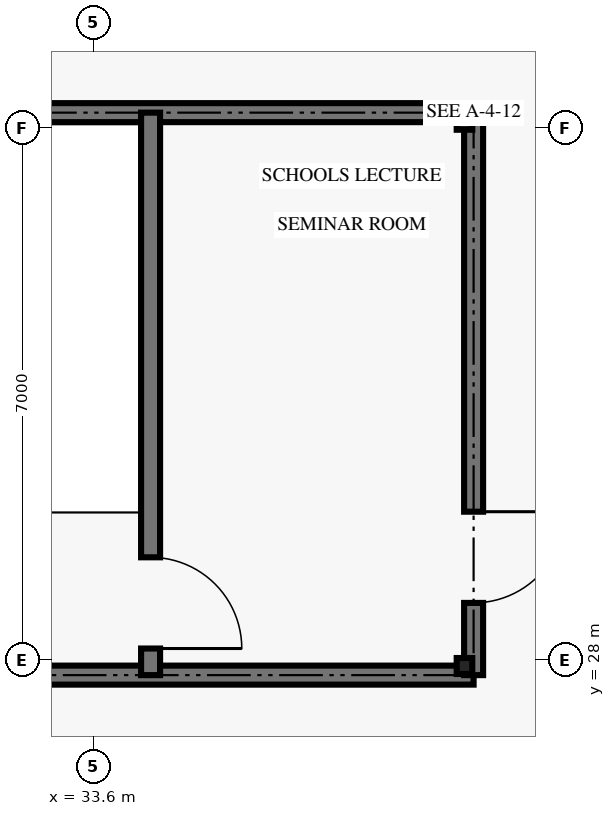
"""IFC4 building model, lengths in metres.
Left out: names, types, materials, properties, quantities, classifications, styles, units other than length and angle.
Written with IfcOpenShell. Run it as: python <this file> out.ifc"""

import sys

from ifc_helpers import new_model, si_unit, direction, frame, frame_2d, origin, origin_2d, place, context, subcontext, project, spatial, rectangle, i_section, extrude, element, fill, save


model = new_model("IFC4")
c1 = context("Model", 3, precision=1e-05, world=origin(), true_north=direction((0.0, 1.0)))
c2 = subcontext(c1, "Body", "Model", "MODEL_VIEW")
j1 = project(units=[si_unit("LENGTHUNIT", "METRE"), si_unit("PLANEANGLEUNIT", "RADIAN")], contexts=[c1])
p1 = place(None, origin())
s1 = spatial("IfcSite", under=j1, at=p1, CompositionType="ELEMENT")
p2 = place(p1, origin())
s2 = spatial("IfcBuilding", under=s1, at=p2, CompositionType="ELEMENT")
p3 = place(p2, frame((0.0, 0.0, 5.4)))
s3 = spatial("IfcBuildingStorey", under=s2, at=p3, CompositionType="ELEMENT", Elevation=5.4)
for number, where, z_axis, x_axis in (
    (1, (38.48, 27.92, 0.0), (0.0, 0.0, 1.0), (1.0, 0.0, 0.0)),
    (2, (38.48, 35.08, 0.0), (0.0, 0.0, 1.0), (1.0, 0.0, 0.0)),
):
    element("IfcColumn", number, at=place(p3, frame(where, z_axis=z_axis, x_axis=x_axis)), inside=s3, PredefinedType="COLUMN", context=c2, shape_type="SweptSolid", body=[
        extrude(i_section(OverallWidth=0.205, OverallDepth=0.21, WebThickness=0.009, FlangeThickness=0.014, FilletRadius=0.01, at=origin_2d()), origin(), (0.0, 0.0, 1.0), 4.8),
    ])
for number, where, z_axis, x_axis in (
    (3, (29.4, 35.2, 0.0), (0.0, 0.0, 1.0), (1.0, 0.0, 0.0)),
    (4, (38.6, 27.8, 0.0), (0.0, 0.0, 1.0), (-1.0, 0.0, 0.0)),
):
    element("IfcWall", number, at=place(p3, frame(where, z_axis=z_axis, x_axis=x_axis)), inside=s3, PredefinedType="SHEAR", context=c2, shape_type="SweptSolid", body=[
        extrude(rectangle(XDim=9.2, YDim=0.25, at=frame_2d((4.6, 0.0))), origin(), (0.0, 0.0, 1.0), 4.56),
    ])
p4 = place(p3, frame((38.6, 35.2, 0.0), z_axis=(0.0, 0.0, 1.0), x_axis=(0.0, -1.0, 0.0)))
e5 = element("IfcWall", 5, at=p4, inside=s3, PredefinedType="SHEAR", context=c2, shape_type="SweptSolid", body=[
    extrude(rectangle(XDim=7.4, YDim=0.25, at=frame_2d((3.7, 0.0))), origin(), (0.0, 0.0, 1.0), 4.56),
])
p5 = place(p4, frame((5.25, 0.0, 0.0)))
e6 = element("IfcOpeningElement", 6, at=p5, cuts=e5, PredefinedType="OPENING", context=c2, shape_type="SweptSolid", body=[
    extrude(rectangle(XDim=1.2, YDim=2.2, at=frame_2d((0.6, 1.1))), frame((0.0, 0.135, 0.0), z_axis=(0.0, -1.0, 0.0), x_axis=(1.0, 0.0, 0.0)), (0.0, 0.0, 1.0), 0.27),
])
p6 = place(p3, frame((34.35, 35.2, 0.0), z_axis=(0.0, 0.0, 1.0), x_axis=(0.0, -1.0, 0.0)))
e7 = element("IfcWall", 7, at=p6, inside=s3, PredefinedType="SHEAR", context=c2, shape_type="SweptSolid", body=[
    extrude(rectangle(XDim=7.4, YDim=0.25, at=frame_2d((3.7, 0.0))), origin(), (0.0, 0.0, 1.0), 4.56),
])
p7 = place(p6, frame((5.85, 0.0, 0.0)))
e8 = element("IfcOpeningElement", 8, at=p7, cuts=e7, PredefinedType="OPENING", context=c2, shape_type="SweptSolid", body=[
    extrude(rectangle(XDim=1.2, YDim=2.2, at=frame_2d((0.6, 1.1))), frame((0.0, 0.135, 0.0), z_axis=(0.0, -1.0, 0.0), x_axis=(1.0, 0.0, 0.0)), (0.0, 0.0, 1.0), 0.27),
])
p8 = place(p5, origin())
e9 = element("IfcDoor", 9, at=p8, inside=s3, OperationType="SINGLE_SWING_LEFT", PredefinedType="DOOR", context=c2, shape_type="SweptSolid", body=[
    extrude(rectangle(XDim=1.2, YDim=2.2, at=frame_2d((0.6, 1.1))), frame((0.0, 0.025, 0.0), z_axis=(0.0, -1.0, 0.0), x_axis=(1.0, 0.0, 0.0)), (0.0, 0.0, 1.0), 0.05),
])
fill(e6, e9)
p9 = place(p7, origin())
e10 = element("IfcDoor", 10, at=p9, inside=s3, OperationType="SINGLE_SWING_RIGHT", PredefinedType="DOOR", context=c2, shape_type="SweptSolid", body=[
    extrude(rectangle(XDim=1.2, YDim=2.2, at=frame_2d((0.6, 1.1))), frame((0.0, 0.025, 0.0), z_axis=(0.0, -1.0, 0.0), x_axis=(1.0, 0.0, 0.0)), (0.0, 0.0, 1.0), 0.05),
])
fill(e8, e10)
save(model, sys.argv[1])
